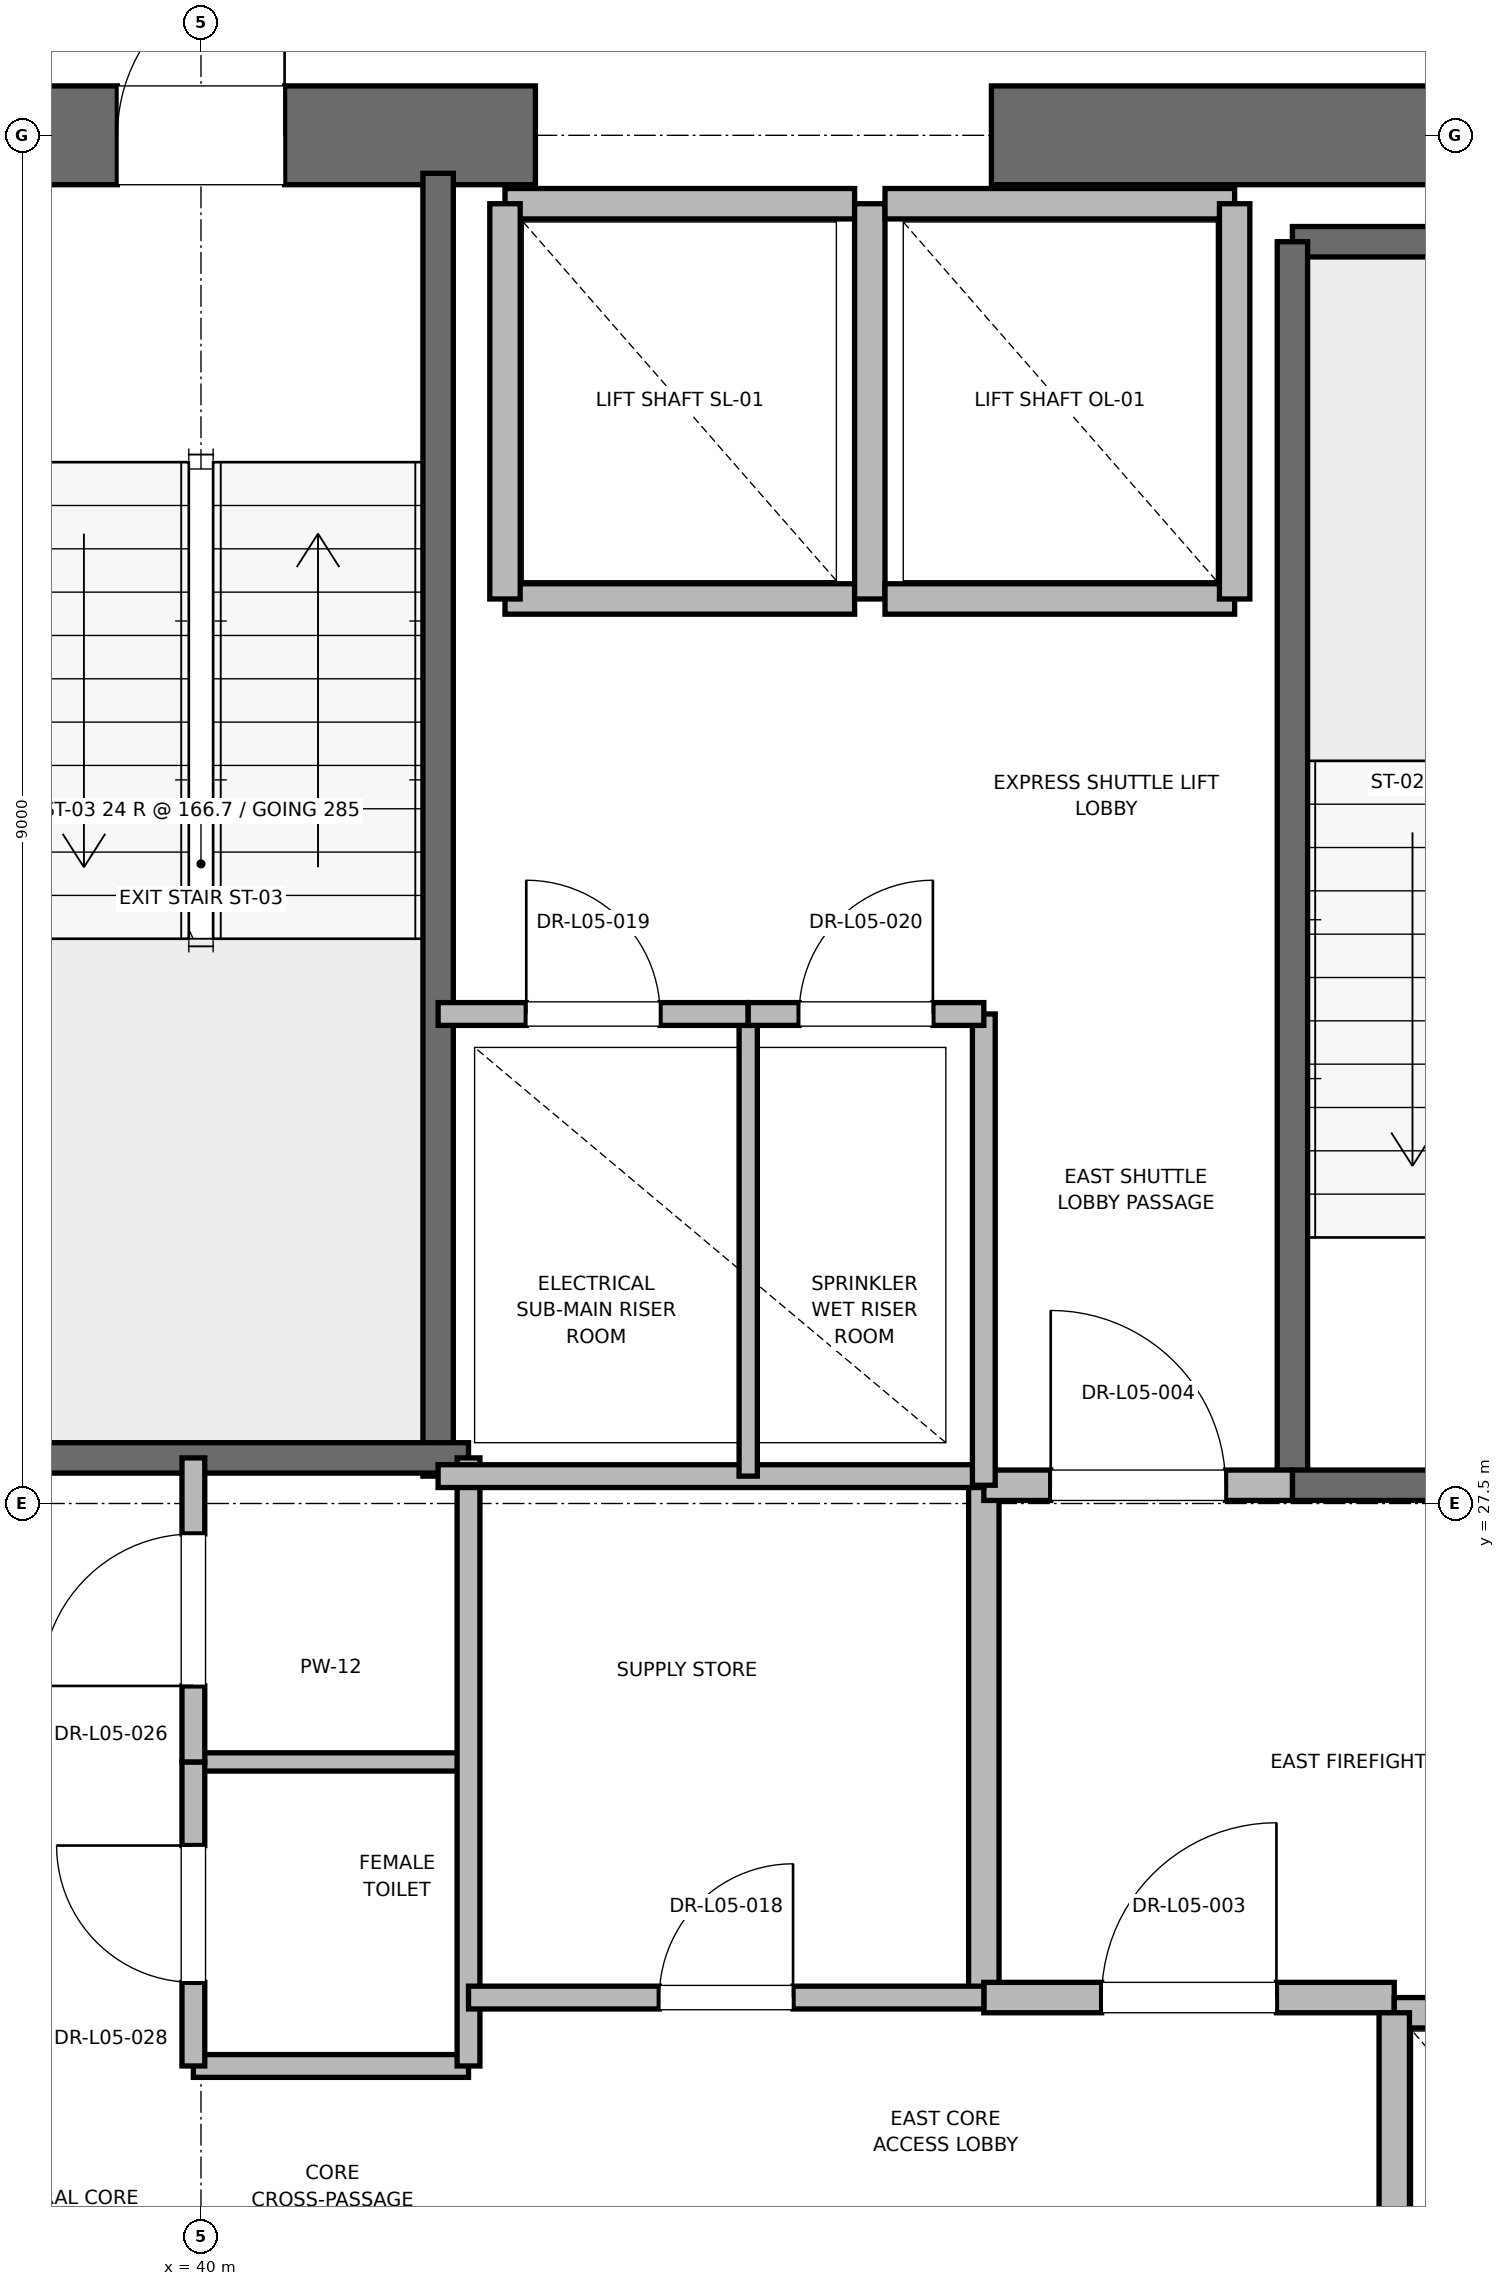
"""IFC4 building model, lengths in metres.
Left out: names, types, materials, properties, quantities, classifications, styles, units other than length and angle.
Written with IfcOpenShell. Run it as: python <this file> out.ifc"""

import sys

from ifc_helpers import new_model, si_unit, direction, frame, frame_2d, origin, place, context, subcontext, project, spatial, rectangle, extrude, element, fill, save


model = new_model("IFC4")
c1 = context("Model", 3, precision=1e-05, world=origin(), true_north=direction((0.0, 1.0)))
c2 = subcontext(c1, "Body", "Model", "MODEL_VIEW")
j1 = project(units=[si_unit("LENGTHUNIT", "METRE"), si_unit("PLANEANGLEUNIT", "RADIAN")], contexts=[c1])
p1 = place(None, origin())
s1 = spatial("IfcSite", under=j1, at=p1, CompositionType="ELEMENT")
p2 = place(p1, origin())
s2 = spatial("IfcBuilding", under=s1, at=p2, CompositionType="ELEMENT")
p3 = place(p2, frame((0.0, 0.0, 27.6)))
s3 = spatial("IfcBuildingStorey", under=s2, at=p3, CompositionType="ELEMENT", Elevation=27.6)
p4 = place(p3, frame((37.8, 36.5, 0.0), z_axis=(0.0, 0.0, 1.0), x_axis=(1.0, 0.0, 0.0)))
e1 = element("IfcWall", 1, at=p4, inside=s3, PredefinedType="SHEAR", context=c2, shape_type="SweptSolid", body=[
    extrude(rectangle(XDim=4.4, YDim=0.65, at=frame_2d((2.2, 0.0))), origin(), (0.0, 0.0, 1.0), 3.76),
])
p5 = place(p4, frame((1.65, 0.0, 0.0)))
e2 = element("IfcOpeningElement", 2, at=p5, cuts=e1, PredefinedType="OPENING", context=c2, shape_type="SweptSolid", body=[
    extrude(rectangle(XDim=1.1, YDim=2.15, at=frame_2d((0.55, 1.075))), frame((0.0, 0.325, 0.0), z_axis=(0.0, -1.0, 0.0), x_axis=(1.0, 0.0, 0.0)), (0.0, 0.0, 1.0), 0.65),
])
p6 = place(p3, frame((45.2, 36.5, 0.0), z_axis=(0.0, 0.0, 1.0), x_axis=(1.0, 0.0, 0.0)))
e3 = element("IfcWall", 3, at=p6, inside=s3, PredefinedType="SHEAR", context=c2, shape_type="SweptSolid", body=[
    extrude(rectangle(XDim=5.8, YDim=0.65, at=frame_2d((2.9, 0.0))), origin(), (0.0, 0.0, 1.0), 3.76),
])
p7 = place(p3, frame((47.18, 35.8, 0.0), z_axis=(0.0, 0.0, 1.0), x_axis=(1.0, 0.0, 0.0)))
e4 = element("IfcWall", 4, at=p7, inside=s3, PredefinedType="SOLIDWALL", context=c2, shape_type="SweptSolid", body=[
    extrude(rectangle(XDim=3.12, YDim=0.2, at=frame_2d((1.56, 0.0))), origin(), (0.0, 0.0, 1.0), 3.76),
])
p8 = place(p3, frame((47.18, 27.62, 0.0), z_axis=(0.0, 0.0, 1.0), x_axis=(0.0, 1.0, 0.0)))
e5 = element("IfcWall", 5, at=p8, inside=s3, PredefinedType="SOLIDWALL", context=c2, shape_type="SweptSolid", body=[
    extrude(rectangle(XDim=8.18, YDim=0.2, at=frame_2d((4.09, 0.0))), origin(), (0.0, 0.0, 1.0), 3.76),
])
p9 = place(p3, frame((47.18, 27.62, 0.0), z_axis=(0.0, 0.0, 1.0), x_axis=(1.0, 0.0, 0.0)))
e6 = element("IfcWall", 6, at=p9, inside=s3, PredefinedType="SOLIDWALL", context=c2, shape_type="SweptSolid", body=[
    extrude(rectangle(XDim=3.12, YDim=0.2, at=frame_2d((1.56, 0.0))), origin(), (0.0, 0.0, 1.0), 3.76),
])
p10 = place(p9, frame((1.01, 0.0, 0.0)))
e7 = element("IfcOpeningElement", 7, at=p10, cuts=e6, PredefinedType="OPENING", context=c2, shape_type="SweptSolid", body=[
    extrude(rectangle(XDim=1.1, YDim=2.15, at=frame_2d((0.55, 1.075))), frame((0.0, 0.1, 0.0), z_axis=(0.0, -1.0, 0.0), x_axis=(1.0, 0.0, 0.0)), (0.0, 0.0, 1.0), 0.2),
])
p11 = place(p3, frame((41.56, 27.68, 0.0), z_axis=(0.0, 0.0, 1.0), x_axis=(0.0, 1.0, 0.0)))
e8 = element("IfcWall", 8, at=p11, inside=s3, PredefinedType="SOLIDWALL", context=c2, shape_type="SweptSolid", body=[
    extrude(rectangle(XDim=8.57, YDim=0.2, at=frame_2d((4.285, 0.0))), origin(), (0.0, 0.0, 1.0), 3.76),
])
p12 = place(p3, frame((38.44, 27.8, 0.0), z_axis=(0.0, 0.0, 1.0), x_axis=(1.0, 0.0, 0.0)))
e9 = element("IfcWall", 9, at=p12, inside=s3, PredefinedType="SOLIDWALL", context=c2, shape_type="SweptSolid", body=[
    extrude(rectangle(XDim=3.32, YDim=0.2, at=frame_2d((1.66, 0.0))), origin(), (0.0, 0.0, 1.0), 3.76),
])
p13 = place(p3, frame((45.15, 24.25, 0.0), z_axis=(0.0, 0.0, 1.0), x_axis=(0.0, 1.0, 0.0)))
e10 = element("IfcWall", 10, at=p13, inside=s3, PredefinedType="PARTITIONING", context=c2, shape_type="SweptSolid", body=[
    extrude(rectangle(XDim=3.37, YDim=0.2, at=frame_2d((1.685, 0.0))), origin(), (0.0, 0.0, 1.0), 3.76),
])
p14 = place(p3, frame((45.15, 24.25, 0.0), z_axis=(0.0, 0.0, 1.0), x_axis=(1.0, 0.0, 0.0)))
e11 = element("IfcWall", 11, at=p14, inside=s3, PredefinedType="PARTITIONING", context=c2, shape_type="SweptSolid", body=[
    extrude(rectangle(XDim=2.7, YDim=0.2, at=frame_2d((1.35, 0.0))), origin(), (0.0, 0.0, 1.0), 3.76),
])
p15 = place(p14, frame((0.775, 0.0, 0.0)))
e12 = element("IfcOpeningElement", 12, at=p15, cuts=e11, PredefinedType="OPENING", context=c2, shape_type="SweptSolid", body=[
    extrude(rectangle(XDim=1.15, YDim=2.2, at=frame_2d((0.575, 1.1))), frame((0.0, 0.1, 0.0), z_axis=(0.0, -1.0, 0.0), x_axis=(1.0, 0.0, 0.0)), (0.0, 0.0, 1.0), 0.2),
])
p16 = place(p3, frame((45.15, 27.62, 0.0), z_axis=(0.0, 0.0, 1.0), x_axis=(1.0, 0.0, 0.0)))
e13 = element("IfcWall", 13, at=p16, inside=s3, PredefinedType="PARTITIONING", context=c2, shape_type="SweptSolid", body=[
    extrude(rectangle(XDim=2.03, YDim=0.2, at=frame_2d((1.015, 0.0))), origin(), (0.0, 0.0, 1.0), 3.76),
])
p17 = place(p16, frame((0.44, 0.0, 0.0)))
e14 = element("IfcOpeningElement", 14, at=p17, cuts=e13, PredefinedType="OPENING", context=c2, shape_type="SweptSolid", body=[
    extrude(rectangle(XDim=1.15, YDim=2.2, at=frame_2d((0.575, 1.1))), frame((0.0, 0.1, 0.0), z_axis=(0.0, -1.0, 0.0), x_axis=(1.0, 0.0, 0.0)), (0.0, 0.0, 1.0), 0.2),
])
p18 = place(p3, frame((50.45, 24.15, 0.0), z_axis=(0.0, 0.0, 1.0), x_axis=(-1.0, 0.0, 0.0)))
e15 = element("IfcWall", 15, at=p18, inside=s3, PredefinedType="SOLIDWALL", context=c2, shape_type="SweptSolid", body=[
    extrude(rectangle(XDim=2.6, YDim=0.2, at=frame_2d((1.3, 0.0))), origin(), (0.0, 0.0, 1.0), 2.54),
])
p19 = place(p18, frame((0.75, 0.0, 0.0)))
e16 = element("IfcOpeningElement", 16, at=p19, cuts=e15, PredefinedType="OPENING", context=c2, shape_type="SweptSolid", body=[
    extrude(rectangle(XDim=1.1, YDim=2.2, at=frame_2d((0.55, 1.1))), frame((0.0, 0.1, 0.0), z_axis=(0.0, -1.0, 0.0), x_axis=(1.0, 0.0, 0.0)), (0.0, 0.0, 1.0), 0.2),
])
p20 = place(p3, frame((47.85, 24.15, 0.0), z_axis=(0.0, 0.0, 1.0), x_axis=(0.0, -1.0, 0.0)))
e17 = element("IfcWall", 17, at=p20, inside=s3, PredefinedType="SOLIDWALL", context=c2, shape_type="SweptSolid", body=[
    extrude(rectangle(XDim=3.0, YDim=0.2, at=frame_2d((1.5, 0.0))), origin(), (0.0, 0.0, 1.0), 3.76),
])
p21 = place(p3, frame((42.0, 33.45, 0.0), z_axis=(0.0, 0.0, 1.0), x_axis=(1.0, 0.0, 0.0)))
e18 = element("IfcWall", 18, at=p21, inside=s3, PredefinedType="SOLIDWALL", context=c2, shape_type="SweptSolid", body=[
    extrude(rectangle(XDim=2.3, YDim=0.2, at=frame_2d((1.15, 0.0))), origin(), (0.0, 0.0, 1.0), 3.76),
])
p22 = place(p3, frame((44.3, 36.05, 0.0), z_axis=(0.0, 0.0, 1.0), x_axis=(-1.0, 0.0, 0.0)))
e19 = element("IfcWall", 19, at=p22, inside=s3, PredefinedType="SOLIDWALL", context=c2, shape_type="SweptSolid", body=[
    extrude(rectangle(XDim=2.3, YDim=0.2, at=frame_2d((1.15, 0.0))), origin(), (0.0, 0.0, 1.0), 2.54),
])
for number, where, z_axis, x_axis in (
    (20, (42.0, 36.05, 0.0), (0.0, 0.0, 1.0), (0.0, -1.0, 0.0)),
    (21, (44.4, 33.45, 0.0), (0.0, 0.0, 1.0), (0.0, 1.0, 0.0)),
):
    element("IfcWall", number, at=place(p3, frame(where, z_axis=z_axis, x_axis=x_axis)), inside=s3, PredefinedType="SOLIDWALL", context=c2, shape_type="SweptSolid", body=[
        extrude(rectangle(XDim=2.6, YDim=0.2, at=frame_2d((1.3, 0.0))), origin(), (0.0, 0.0, 1.0), 2.54),
    ])
p23 = place(p3, frame((44.5, 33.45, 0.0), z_axis=(0.0, 0.0, 1.0), x_axis=(1.0, 0.0, 0.0)))
e22 = element("IfcWall", 22, at=p23, inside=s3, PredefinedType="SOLIDWALL", context=c2, shape_type="SweptSolid", body=[
    extrude(rectangle(XDim=2.3, YDim=0.2, at=frame_2d((1.15, 0.0))), origin(), (0.0, 0.0, 1.0), 3.76),
])
p24 = place(p3, frame((46.8, 36.05, 0.0), z_axis=(0.0, 0.0, 1.0), x_axis=(-1.0, 0.0, 0.0)))
e23 = element("IfcWall", 23, at=p24, inside=s3, PredefinedType="SOLIDWALL", context=c2, shape_type="SweptSolid", body=[
    extrude(rectangle(XDim=2.3, YDim=0.2, at=frame_2d((1.15, 0.0))), origin(), (0.0, 0.0, 1.0), 2.54),
])
p25 = place(p3, frame((46.8, 33.45, 0.0), z_axis=(0.0, 0.0, 1.0), x_axis=(0.0, 1.0, 0.0)))
e24 = element("IfcWall", 24, at=p25, inside=s3, PredefinedType="SOLIDWALL", context=c2, shape_type="SweptSolid", body=[
    extrude(rectangle(XDim=2.6, YDim=0.2, at=frame_2d((1.3, 0.0))), origin(), (0.0, 0.0, 1.0), 3.76),
])
p26 = place(p3, frame((39.95, 23.8, 0.0), z_axis=(0.0, 0.0, 1.0), x_axis=(1.0, 0.0, 0.0)))
e25 = element("IfcWall", 25, at=p26, inside=s3, PredefinedType="PARTITIONING", context=c2, shape_type="SweptSolid", body=[
    extrude(rectangle(XDim=1.81, YDim=0.15, at=frame_2d((0.905, 0.0))), origin(), (0.0, 0.0, 1.0), 2.85),
])
p27 = place(p3, frame((39.95, 25.8, 0.0), z_axis=(0.0, 0.0, 1.0), x_axis=(1.0, 0.0, 0.0)))
e26 = element("IfcWall", 26, at=p27, inside=s3, PredefinedType="PARTITIONING", context=c2, shape_type="SweptSolid", body=[
    extrude(rectangle(XDim=1.81, YDim=0.12, at=frame_2d((0.905, 0.0))), origin(), (0.0, 0.0, 1.0), 2.85),
])
p28 = place(p3, frame((41.76, 23.8, 0.0), z_axis=(0.0, 0.0, 1.0), x_axis=(0.0, 1.0, 0.0)))
e27 = element("IfcWall", 27, at=p28, inside=s3, PredefinedType="PARTITIONING", context=c2, shape_type="SweptSolid", body=[
    extrude(rectangle(XDim=4.0, YDim=0.15, at=frame_2d((2.0, 0.0))), origin(), (0.0, 0.0, 1.0), 2.85),
])
p29 = place(p3, frame((39.95, 23.8, 0.0), z_axis=(0.0, 0.0, 1.0), x_axis=(0.0, 1.0, 0.0)))
e28 = element("IfcWall", 28, at=p29, inside=s3, PredefinedType="PARTITIONING", context=c2, shape_type="SweptSolid", body=[
    extrude(rectangle(XDim=2.0, YDim=0.15, at=frame_2d((1.0, 0.0))), origin(), (0.0, 0.0, 1.0), 2.85),
])
p30 = place(p29, frame((0.55, 0.0, 0.0)))
e29 = element("IfcOpeningElement", 29, at=p30, cuts=e28, PredefinedType="OPENING", context=c2, shape_type="SweptSolid", body=[
    extrude(rectangle(XDim=0.9, YDim=2.1, at=frame_2d((0.45, 1.05))), frame((0.0, 0.075, 0.0), z_axis=(0.0, -1.0, 0.0), x_axis=(1.0, 0.0, 0.0)), (0.0, 0.0, 1.0), 0.15),
])
p31 = place(p3, frame((39.95, 25.8, 0.0), z_axis=(0.0, 0.0, 1.0), x_axis=(0.0, 1.0, 0.0)))
e30 = element("IfcWall", 30, at=p31, inside=s3, PredefinedType="PARTITIONING", context=c2, shape_type="SweptSolid", body=[
    extrude(rectangle(XDim=2.0, YDim=0.15, at=frame_2d((1.0, 0.0))), origin(), (0.0, 0.0, 1.0), 2.85),
])
p32 = place(p31, frame((0.5, 0.0, 0.0)))
e31 = element("IfcOpeningElement", 31, at=p32, cuts=e30, PredefinedType="OPENING", context=c2, shape_type="SweptSolid", body=[
    extrude(rectangle(XDim=1.0, YDim=2.15, at=frame_2d((0.5, 1.075))), frame((0.0, 0.075, 0.0), z_axis=(0.0, -1.0, 0.0), x_axis=(1.0, 0.0, 0.0)), (0.0, 0.0, 1.0), 0.15),
])
p33 = place(p3, frame((41.56, 27.68, 0.0), z_axis=(0.0, 0.0, 1.0), x_axis=(1.0, 0.0, 0.0)))
e32 = element("IfcWall", 32, at=p33, inside=s3, PredefinedType="PARTITIONING", context=c2, shape_type="SweptSolid", body=[
    extrude(rectangle(XDim=3.59, YDim=0.15, at=frame_2d((1.795, 0.0))), origin(), (0.0, 0.0, 1.0), 2.85),
])
p34 = place(p3, frame((41.76, 24.25, 0.0), z_axis=(0.0, 0.0, 1.0), x_axis=(1.0, 0.0, 0.0)))
e33 = element("IfcWall", 33, at=p34, inside=s3, PredefinedType="PARTITIONING", context=c2, shape_type="SweptSolid", body=[
    extrude(rectangle(XDim=3.39, YDim=0.15, at=frame_2d((1.695, 0.0))), origin(), (0.0, 0.0, 1.0), 2.85),
])
p35 = place(p34, frame((1.255, 0.0, 0.0)))
e34 = element("IfcOpeningElement", 34, at=p35, cuts=e33, PredefinedType="OPENING", context=c2, shape_type="SweptSolid", body=[
    extrude(rectangle(XDim=0.88, YDim=2.1, at=frame_2d((0.44, 1.05))), frame((0.0, 0.075, 0.0), z_axis=(0.0, -1.0, 0.0), x_axis=(1.0, 0.0, 0.0)), (0.0, 0.0, 1.0), 0.15),
])
p36 = place(p3, frame((45.15, 27.62, 0.0), z_axis=(0.0, 0.0, 1.0), x_axis=(0.0, 1.0, 0.0)))
e35 = element("IfcWall", 35, at=p36, inside=s3, PredefinedType="PARTITIONING", context=c2, shape_type="SweptSolid", body=[
    extrude(rectangle(XDim=3.1, YDim=0.15, at=frame_2d((1.55, 0.0))), origin(), (0.0, 0.0, 1.0), 2.85),
])
p37 = place(p3, frame((43.6, 27.68, 0.0), z_axis=(0.0, 0.0, 1.0), x_axis=(0.0, 1.0, 0.0)))
e36 = element("IfcWall", 36, at=p37, inside=s3, PredefinedType="PARTITIONING", context=c2, shape_type="SweptSolid", body=[
    extrude(rectangle(XDim=3.04, YDim=0.12, at=frame_2d((1.52, 0.0))), origin(), (0.0, 0.0, 1.0), 2.85),
])
p38 = place(p3, frame((41.56, 30.72, 0.0), z_axis=(0.0, 0.0, 1.0), x_axis=(1.0, 0.0, 0.0)))
e37 = element("IfcWall", 37, at=p38, inside=s3, PredefinedType="PARTITIONING", context=c2, shape_type="SweptSolid", body=[
    extrude(rectangle(XDim=2.04, YDim=0.15, at=frame_2d((1.02, 0.0))), origin(), (0.0, 0.0, 1.0), 2.85),
])
p39 = place(p38, frame((0.58, 0.0, 0.0)))
e38 = element("IfcOpeningElement", 38, at=p39, cuts=e37, PredefinedType="OPENING", context=c2, shape_type="SweptSolid", body=[
    extrude(rectangle(XDim=0.88, YDim=2.1, at=frame_2d((0.44, 1.05))), frame((0.0, 0.075, 0.0), z_axis=(0.0, -1.0, 0.0), x_axis=(1.0, 0.0, 0.0)), (0.0, 0.0, 1.0), 0.15),
])
p40 = place(p3, frame((43.6, 30.72, 0.0), z_axis=(0.0, 0.0, 1.0), x_axis=(1.0, 0.0, 0.0)))
e39 = element("IfcWall", 39, at=p40, inside=s3, PredefinedType="PARTITIONING", context=c2, shape_type="SweptSolid", body=[
    extrude(rectangle(XDim=1.55, YDim=0.15, at=frame_2d((0.775, 0.0))), origin(), (0.0, 0.0, 1.0), 2.85),
])
p41 = place(p40, frame((0.335, 0.0, 0.0)))
e40 = element("IfcOpeningElement", 40, at=p41, cuts=e39, PredefinedType="OPENING", context=c2, shape_type="SweptSolid", body=[
    extrude(rectangle(XDim=0.88, YDim=2.1, at=frame_2d((0.44, 1.05))), frame((0.0, 0.075, 0.0), z_axis=(0.0, -1.0, 0.0), x_axis=(1.0, 0.0, 0.0)), (0.0, 0.0, 1.0), 0.15),
])
p42 = place(p5, origin())
e41 = element("IfcDoor", 41, at=p42, inside=s3, OperationType="SINGLE_SWING_RIGHT", PredefinedType="DOOR", context=c2, shape_type="SweptSolid", body=[
    extrude(rectangle(XDim=1.1, YDim=2.15, at=frame_2d((0.55, 1.075))), frame((0.0, 0.025, 0.0), z_axis=(0.0, -1.0, 0.0), x_axis=(1.0, 0.0, 0.0)), (0.0, 0.0, 1.0), 0.05),
])
fill(e2, e41)
p43 = place(p15, origin())
e42 = element("IfcDoor", 42, at=p43, inside=s3, OperationType="SINGLE_SWING_RIGHT", PredefinedType="DOOR", context=c2, shape_type="SweptSolid", body=[
    extrude(rectangle(XDim=1.15, YDim=2.2, at=frame_2d((0.575, 1.1))), frame((0.0, 0.025, 0.0), z_axis=(0.0, -1.0, 0.0), x_axis=(1.0, 0.0, 0.0)), (0.0, 0.0, 1.0), 0.05),
])
fill(e12, e42)
p44 = place(p17, origin())
e43 = element("IfcDoor", 43, at=p44, inside=s3, OperationType="SINGLE_SWING_LEFT", PredefinedType="DOOR", context=c2, shape_type="SweptSolid", body=[
    extrude(rectangle(XDim=1.15, YDim=2.2, at=frame_2d((0.575, 1.1))), frame((0.0, 0.025, 0.0), z_axis=(0.0, -1.0, 0.0), x_axis=(1.0, 0.0, 0.0)), (0.0, 0.0, 1.0), 0.05),
])
fill(e14, e43)
p45 = place(p30, origin())
e44 = element("IfcDoor", 44, at=p45, inside=s3, OperationType="SINGLE_SWING_RIGHT", PredefinedType="DOOR", context=c2, shape_type="SweptSolid", body=[
    extrude(rectangle(XDim=0.9, YDim=2.1, at=frame_2d((0.45, 1.05))), frame((0.0, 0.025, 0.0), z_axis=(0.0, -1.0, 0.0), x_axis=(1.0, 0.0, 0.0)), (0.0, 0.0, 1.0), 0.05),
])
fill(e29, e44)
p46 = place(p32, origin())
e45 = element("IfcDoor", 45, at=p46, inside=s3, OperationType="SINGLE_SWING_LEFT", PredefinedType="DOOR", context=c2, shape_type="SweptSolid", body=[
    extrude(rectangle(XDim=1.0, YDim=2.15, at=frame_2d((0.5, 1.075))), frame((0.0, 0.025, 0.0), z_axis=(0.0, -1.0, 0.0), x_axis=(1.0, 0.0, 0.0)), (0.0, 0.0, 1.0), 0.05),
])
fill(e31, e45)
p47 = place(p35, origin())
e46 = element("IfcDoor", 46, at=p47, inside=s3, OperationType="SINGLE_SWING_RIGHT", PredefinedType="DOOR", context=c2, shape_type="SweptSolid", body=[
    extrude(rectangle(XDim=0.88, YDim=2.1, at=frame_2d((0.44, 1.05))), frame((0.0, 0.025, 0.0), z_axis=(0.0, -1.0, 0.0), x_axis=(1.0, 0.0, 0.0)), (0.0, 0.0, 1.0), 0.05),
])
fill(e34, e46)
p48 = place(p39, origin())
e47 = element("IfcDoor", 47, at=p48, inside=s3, OperationType="SINGLE_SWING_LEFT", PredefinedType="DOOR", context=c2, shape_type="SweptSolid", body=[
    extrude(rectangle(XDim=0.88, YDim=2.1, at=frame_2d((0.44, 1.05))), frame((0.0, 0.025, 0.0), z_axis=(0.0, -1.0, 0.0), x_axis=(1.0, 0.0, 0.0)), (0.0, 0.0, 1.0), 0.05),
])
fill(e38, e47)
p49 = place(p41, origin())
e48 = element("IfcDoor", 48, at=p49, inside=s3, OperationType="SINGLE_SWING_RIGHT", PredefinedType="DOOR", context=c2, shape_type="SweptSolid", body=[
    extrude(rectangle(XDim=0.88, YDim=2.1, at=frame_2d((0.44, 1.05))), frame((0.0, 0.025, 0.0), z_axis=(0.0, -1.0, 0.0), x_axis=(1.0, 0.0, 0.0)), (0.0, 0.0, 1.0), 0.05),
])
fill(e40, e48)
save(model, sys.argv[1])
